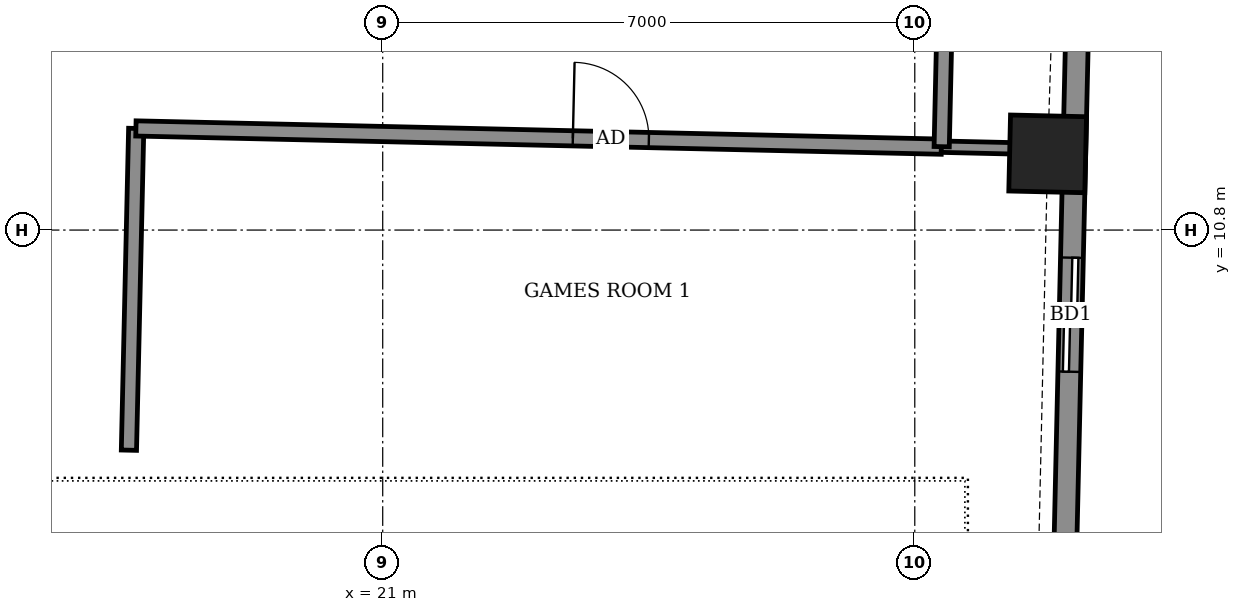
"""IFC4 building model, lengths in metres.
Left out: names, types, materials, properties, quantities, classifications, styles, units other than length and angle.
Written with IfcOpenShell. Run it as: python <this file> out.ifc"""

import sys

from ifc_helpers import new_model, si_unit, direction, frame, frame_2d, origin, origin_2d, place, context, subcontext, project, spatial, rectangle, extrude, element, fill, save


model = new_model("IFC4")
c1 = context("Model", 3, precision=1e-05, world=origin(), true_north=direction((0.0, 1.0)))
c2 = subcontext(c1, "Body", "Model", "MODEL_VIEW")
j1 = project(units=[si_unit("LENGTHUNIT", "METRE"), si_unit("PLANEANGLEUNIT", "RADIAN")], contexts=[c1])
p1 = place(None, origin())
s1 = spatial("IfcSite", under=j1, at=p1, CompositionType="ELEMENT")
p2 = place(p1, origin())
s2 = spatial("IfcBuilding", under=s1, at=p2, CompositionType="ELEMENT")
p3 = place(p2, frame((0.0, 0.0, 271.7)))
s3 = spatial("IfcBuildingStorey", under=s2, at=p3, CompositionType="ELEMENT", Elevation=271.7)
p4 = place(p3, frame((29.748, 11.802, -0.55), z_axis=(0.0, 0.0, 1.0), x_axis=(0.0226694311, 0.999743015426, 0.0)))
e1 = element("IfcColumn", 1, at=p4, inside=s3, PredefinedType="COLUMN", context=c2, shape_type="SweptSolid", body=[
    extrude(rectangle(XDim=1.0, YDim=1.0, at=origin_2d()), origin(), (0.0, 0.0, 1.0), 3.6),
])
p5 = place(p3, frame((29.923, 4.085, 0.0), z_axis=(0.0, 0.0, 1.0), x_axis=(0.022738672774, 0.999741442954, 0.0)))
e2 = element("IfcWall", 2, at=p5, inside=s3, PredefinedType="SOLIDWALL", context=c2, shape_type="SweptSolid", body=[
    extrude(rectangle(XDim=14.774, YDim=0.3, at=frame_2d((7.387, 0.0))), origin(), (0.0, 0.0, 1.0), 2.55),
])
p6 = place(p5, frame((4.853, 0.0, 0.0)))
e3 = element("IfcOpeningElement", 3, at=p6, cuts=e2, PredefinedType="OPENING", context=c2, shape_type="SweptSolid", body=[
    extrude(rectangle(XDim=1.5, YDim=2.4, at=frame_2d((0.75, 1.2))), frame((0.0, 0.16, 0.0), z_axis=(0.0, -1.0, 0.0), x_axis=(1.0, 0.0, 0.0)), (0.0, 0.0, 1.0), 0.32),
])
p7 = place(p5, frame((10.538, 0.0, 0.9)))
e4 = element("IfcOpeningElement", 4, at=p7, cuts=e2, PredefinedType="OPENING", context=c2, shape_type="SweptSolid", body=[
    extrude(rectangle(XDim=2.4, YDim=1.5, at=frame_2d((1.2, 0.75))), frame((0.0, 0.16, 0.0), z_axis=(0.0, -1.0, 0.0), x_axis=(1.0, 0.0, 0.0)), (0.0, 0.0, 1.0), 0.32),
])
p8 = place(p3, frame((17.661, 7.904, 0.0), z_axis=(0.0, 0.0, 1.0), x_axis=(0.022718785711, 0.999741895079, 0.0)))
e5 = element("IfcWall", 5, at=p8, inside=s3, PredefinedType="PARTITIONING", context=c2, shape_type="SweptSolid", body=[
    extrude(rectangle(XDim=4.234, YDim=0.2, at=frame_2d((2.117, 0.0))), origin(), (0.0, 0.0, 1.0), 3.05),
])
p9 = place(p3, frame((17.753, 12.137, 0.0), z_axis=(0.0, 0.0, 1.0), x_axis=(0.999743663474, -0.022640833553, 0.0)))
e6 = element("IfcWall", 6, at=p9, inside=s3, PredefinedType="PARTITIONING", context=c2, shape_type="SweptSolid", body=[
    extrude(rectangle(XDim=10.6, YDim=0.2, at=frame_2d((5.3, 0.0))), origin(), (0.0, 0.0, 1.0), 3.05),
])
p10 = place(p9, frame((5.75, 0.0, 0.0)))
e7 = element("IfcOpeningElement", 7, at=p10, cuts=e6, PredefinedType="OPENING", context=c2, shape_type="SweptSolid", body=[
    extrude(rectangle(XDim=1.0, YDim=2.1, at=frame_2d((0.5, 1.05))), frame((0.0, 0.11, 0.0), z_axis=(0.0, -1.0, 0.0), x_axis=(1.0, 0.0, 0.0)), (0.0, 0.0, 1.0), 0.22),
])
p11 = place(p3, frame((28.35, 11.897, 0.0), z_axis=(0.0, 0.0, 1.0), x_axis=(0.999734618493, -0.023036765969, 0.0)))
e8 = element("IfcWall", 8, at=p11, inside=s3, PredefinedType="PARTITIONING", context=c2, shape_type="SweptSolid", body=[
    extrude(rectangle(XDim=1.6, YDim=0.15, at=frame_2d((0.8, 0.0))), origin(), (0.0, 0.0, 1.0), 3.05),
])
p12 = place(p3, frame((28.354, 11.897, 0.0), z_axis=(0.0, 0.0, 1.0), x_axis=(0.022632637625, 0.99974384905, 0.0)))
e9 = element("IfcWall", 9, at=p12, inside=s3, PredefinedType="PARTITIONING", context=c2, shape_type="SweptSolid", body=[
    extrude(rectangle(XDim=1.5, YDim=0.2, at=frame_2d((0.75, 0.0))), origin(), (0.0, 0.0, 1.0), 3.05),
])
p13 = place(p6, origin())
e10 = element("IfcDoor", 10, at=p13, inside=s3, OperationType="SLIDING_TO_LEFT", PredefinedType="DOOR", context=c2, shape_type="SweptSolid", body=[
    extrude(rectangle(XDim=1.5, YDim=2.4, at=frame_2d((0.75, 1.2))), frame((0.0, 0.025, 0.0), z_axis=(0.0, -1.0, 0.0), x_axis=(1.0, 0.0, 0.0)), (0.0, 0.0, 1.0), 0.05),
])
fill(e3, e10)
p14 = place(p10, origin())
e11 = element("IfcDoor", 11, at=p14, inside=s3, OperationType="SINGLE_SWING_RIGHT", PredefinedType="DOOR", context=c2, shape_type="SweptSolid", body=[
    extrude(rectangle(XDim=1.0, YDim=2.1, at=frame_2d((0.5, 1.05))), frame((0.0, 0.025, 0.0), z_axis=(0.0, -1.0, 0.0), x_axis=(1.0, 0.0, 0.0)), (0.0, 0.0, 1.0), 0.05),
])
fill(e7, e11)
save(model, sys.argv[1])
